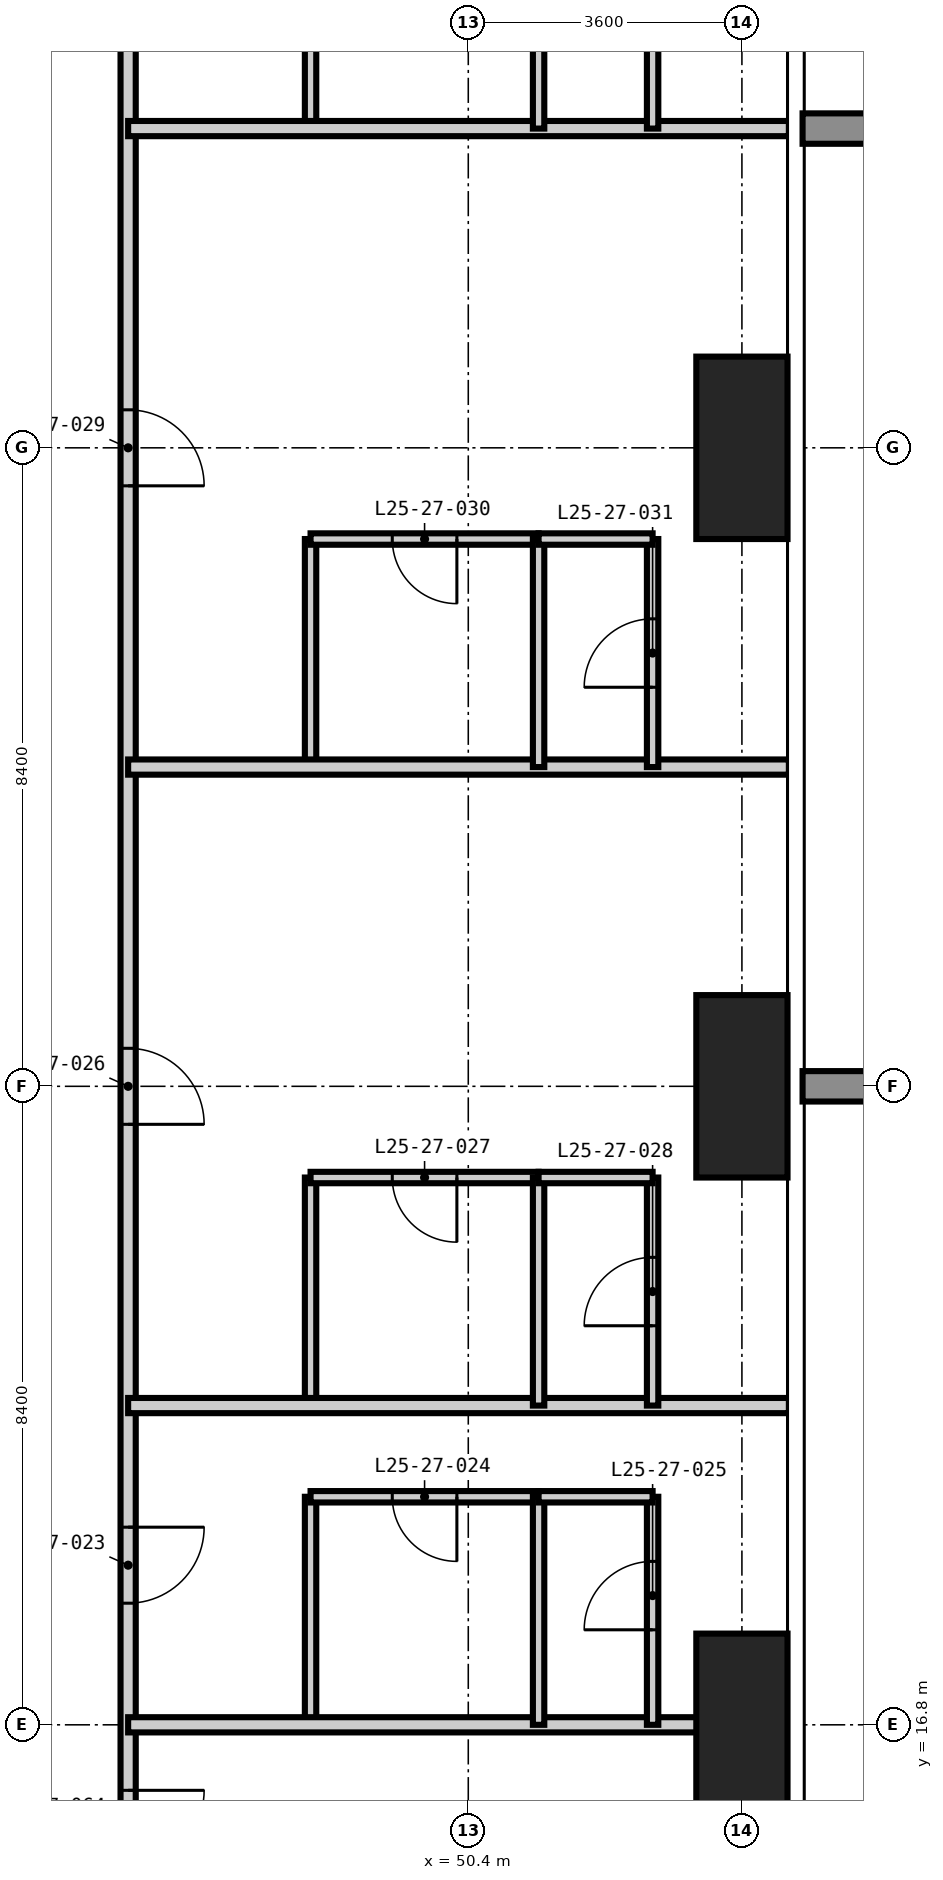
"""IFC4 building model, lengths in metres.
Left out: names, types, materials, properties, quantities, classifications, styles, units other than length and angle.
Written with IfcOpenShell. Run it as: python <this file> out.ifc"""

import sys

from ifc_helpers import new_model, si_unit, direction, frame, frame_2d, origin, origin_2d, place, context, subcontext, project, spatial, rectangle, extrude, element, fill, save


model = new_model("IFC4")
c1 = context("Model", 3, precision=1e-05, world=origin(), true_north=direction((0.0, 1.0)))
c2 = subcontext(c1, "Body", "Model", "MODEL_VIEW")
j1 = project(units=[si_unit("LENGTHUNIT", "METRE"), si_unit("PLANEANGLEUNIT", "RADIAN")], contexts=[c1])
p1 = place(None, origin())
s1 = spatial("IfcSite", under=j1, at=p1, CompositionType="ELEMENT")
p2 = place(p1, origin())
s2 = spatial("IfcBuilding", under=s1, at=p2, CompositionType="ELEMENT")
p3 = place(p2, frame((0.0, 0.0, 100.8)))
s3 = spatial("IfcBuildingStorey", under=s2, at=p3, CompositionType="ELEMENT", Elevation=100.8)
for number, where, z_axis, x_axis in (
    (1, (54.0, 16.8, -0.35), (0.0, 0.0, 1.0), (1.0, 0.0, 0.0)),
    (2, (54.0, 25.2, -0.35), (0.0, 0.0, 1.0), (1.0, 0.0, 0.0)),
    (3, (54.0, 33.6, -0.35), (0.0, 0.0, 1.0), (1.0, 0.0, 0.0)),
):
    element("IfcColumn", number, at=place(p3, frame(where, z_axis=z_axis, x_axis=x_axis)), inside=s3, PredefinedType="COLUMN", context=c2, shape_type="SweptSolid", body=[
        extrude(rectangle(XDim=1.2, YDim=2.4, at=origin_2d()), origin(), (0.0, 0.0, 1.0), 3.6),
    ])
for number, where, z_axis, x_axis in (
    (4, (48.325, 16.8, 0.0), (0.0, 0.0, 1.0), (0.0, 1.0, 0.0)),
    (5, (48.325, 21.0, 0.0), (0.0, 0.0, 1.0), (0.0, 1.0, 0.0)),
    (6, (48.325, 29.4, 0.0), (0.0, 0.0, 1.0), (0.0, 1.0, 0.0)),
    (7, (48.325, 37.8, 0.0), (0.0, 0.0, 1.0), (0.0, 1.0, 0.0)),
):
    element("IfcWall", number, at=place(p3, frame(where, z_axis=z_axis, x_axis=x_axis)), inside=s3, PredefinedType="PARTITIONING", context=c2, shape_type="SweptSolid", body=[
        extrude(rectangle(XDim=3.0, YDim=0.15, at=frame_2d((1.5, 0.0))), origin(), (0.0, 0.0, 1.0), 3.25),
    ])
p4 = place(p3, frame((48.325, 19.8, 0.0), z_axis=(0.0, 0.0, 1.0), x_axis=(1.0, 0.0, 0.0)))
e8 = element("IfcWall", 8, at=p4, inside=s3, PredefinedType="PARTITIONING", context=c2, shape_type="SweptSolid", body=[
    extrude(rectangle(XDim=3.0, YDim=0.15, at=frame_2d((1.5, 0.0))), origin(), (0.0, 0.0, 1.0), 3.25),
])
p5 = place(p4, frame((1.075, 0.0, 0.0)))
e9 = element("IfcOpeningElement", 9, at=p5, cuts=e8, PredefinedType="OPENING", context=c2, shape_type="SweptSolid", body=[
    extrude(rectangle(XDim=0.85, YDim=2.1, at=frame_2d((0.425, 1.05))), frame((0.0, 0.085, 0.0), z_axis=(0.0, -1.0, 0.0), x_axis=(1.0, 0.0, 0.0)), (0.0, 0.0, 1.0), 0.17),
])
p6 = place(p3, frame((48.325, 24.0, 0.0), z_axis=(0.0, 0.0, 1.0), x_axis=(1.0, 0.0, 0.0)))
e10 = element("IfcWall", 10, at=p6, inside=s3, PredefinedType="PARTITIONING", context=c2, shape_type="SweptSolid", body=[
    extrude(rectangle(XDim=3.0, YDim=0.15, at=frame_2d((1.5, 0.0))), origin(), (0.0, 0.0, 1.0), 3.25),
])
p7 = place(p6, frame((1.075, 0.0, 0.0)))
e11 = element("IfcOpeningElement", 11, at=p7, cuts=e10, PredefinedType="OPENING", context=c2, shape_type="SweptSolid", body=[
    extrude(rectangle(XDim=0.85, YDim=2.1, at=frame_2d((0.425, 1.05))), frame((0.0, 0.085, 0.0), z_axis=(0.0, -1.0, 0.0), x_axis=(1.0, 0.0, 0.0)), (0.0, 0.0, 1.0), 0.17),
])
p8 = place(p3, frame((48.325, 32.4, 0.0), z_axis=(0.0, 0.0, 1.0), x_axis=(1.0, 0.0, 0.0)))
e12 = element("IfcWall", 12, at=p8, inside=s3, PredefinedType="PARTITIONING", context=c2, shape_type="SweptSolid", body=[
    extrude(rectangle(XDim=3.0, YDim=0.15, at=frame_2d((1.5, 0.0))), origin(), (0.0, 0.0, 1.0), 3.25),
])
p9 = place(p8, frame((1.075, 0.0, 0.0)))
e13 = element("IfcOpeningElement", 13, at=p9, cuts=e12, PredefinedType="OPENING", context=c2, shape_type="SweptSolid", body=[
    extrude(rectangle(XDim=0.85, YDim=2.1, at=frame_2d((0.425, 1.05))), frame((0.0, 0.085, 0.0), z_axis=(0.0, -1.0, 0.0), x_axis=(1.0, 0.0, 0.0)), (0.0, 0.0, 1.0), 0.17),
])
p10 = place(p3, frame((45.925, 45.325, 0.0), z_axis=(0.0, 0.0, 1.0), x_axis=(0.0, -1.0, 0.0)))
e14 = element("IfcWall", 14, at=p10, inside=s3, PredefinedType="PARTITIONING", context=c2, shape_type="SweptSolid", body=[
    extrude(rectangle(XDim=31.25, YDim=0.2, at=frame_2d((15.625, 0.0))), origin(), (0.0, 0.0, 1.0), 3.25),
])
p11 = place(p10, frame((25.925, 0.0, 0.0)))
e15 = element("IfcOpeningElement", 15, at=p11, cuts=e14, PredefinedType="OPENING", context=c2, shape_type="SweptSolid", body=[
    extrude(rectangle(XDim=1.0, YDim=2.2, at=frame_2d((0.5, 1.1))), frame((0.0, 0.11, 0.0), z_axis=(0.0, -1.0, 0.0), x_axis=(1.0, 0.0, 0.0)), (0.0, 0.0, 1.0), 0.22),
])
p12 = place(p10, frame((19.625, 0.0, 0.0)))
e16 = element("IfcOpeningElement", 16, at=p12, cuts=e14, PredefinedType="OPENING", context=c2, shape_type="SweptSolid", body=[
    extrude(rectangle(XDim=1.0, YDim=2.2, at=frame_2d((0.5, 1.1))), frame((0.0, 0.11, 0.0), z_axis=(0.0, -1.0, 0.0), x_axis=(1.0, 0.0, 0.0)), (0.0, 0.0, 1.0), 0.22),
])
p13 = place(p10, frame((11.225, 0.0, 0.0)))
e17 = element("IfcOpeningElement", 17, at=p13, cuts=e14, PredefinedType="OPENING", context=c2, shape_type="SweptSolid", body=[
    extrude(rectangle(XDim=1.0, YDim=2.2, at=frame_2d((0.5, 1.1))), frame((0.0, 0.11, 0.0), z_axis=(0.0, -1.0, 0.0), x_axis=(1.0, 0.0, 0.0)), (0.0, 0.0, 1.0), 0.22),
])
p14 = place(p10, frame((4.925, 0.0, 0.0)))
e18 = element("IfcOpeningElement", 18, at=p14, cuts=e14, PredefinedType="OPENING", context=c2, shape_type="SweptSolid", body=[
    extrude(rectangle(XDim=1.0, YDim=2.2, at=frame_2d((0.5, 1.1))), frame((0.0, 0.11, 0.0), z_axis=(0.0, -1.0, 0.0), x_axis=(1.0, 0.0, 0.0)), (0.0, 0.0, 1.0), 0.22),
])
p15 = place(p10, frame((29.387, 0.0, 0.0)))
e19 = element("IfcOpeningElement", 19, at=p15, cuts=e14, PredefinedType="OPENING", context=c2, shape_type="SweptSolid", body=[
    extrude(rectangle(XDim=1.0, YDim=2.2, at=frame_2d((0.5, 1.1))), frame((0.0, 0.11, 0.0), z_axis=(0.0, -1.0, 0.0), x_axis=(1.0, 0.0, 0.0)), (0.0, 0.0, 1.0), 0.22),
])
p16 = place(p10, frame((1.162, 0.0, 0.0)))
e20 = element("IfcOpeningElement", 20, at=p16, cuts=e14, PredefinedType="OPENING", context=c2, shape_type="SweptSolid", body=[
    extrude(rectangle(XDim=1.0, YDim=2.2, at=frame_2d((0.5, 1.1))), frame((0.0, 0.11, 0.0), z_axis=(0.0, -1.0, 0.0), x_axis=(1.0, 0.0, 0.0)), (0.0, 0.0, 1.0), 0.22),
])
for number, where, z_axis, x_axis in (
    (21, (45.925, 16.8, 0.0), (0.0, 0.0, 1.0), (1.0, 0.0, 0.0)),
    (22, (45.925, 21.0, 0.0), (0.0, 0.0, 1.0), (1.0, 0.0, 0.0)),
    (23, (45.925, 29.4, 0.0), (0.0, 0.0, 1.0), (1.0, 0.0, 0.0)),
    (24, (45.925, 37.8, 0.0), (0.0, 0.0, 1.0), (1.0, 0.0, 0.0)),
):
    element("IfcWall", number, at=place(p3, frame(where, z_axis=z_axis, x_axis=x_axis)), inside=s3, PredefinedType="PARTITIONING", context=c2, shape_type="SweptSolid", body=[
        extrude(rectangle(XDim=8.693, YDim=0.2, at=frame_2d((4.346, 0.0))), origin(), (0.0, 0.0, 1.0), 3.25),
    ])
for number, where, z_axis, x_axis in (
    (25, (51.325, 16.8, 0.0), (0.0, 0.0, 1.0), (0.0, 1.0, 0.0)),
    (26, (51.325, 21.0, 0.0), (0.0, 0.0, 1.0), (0.0, 1.0, 0.0)),
    (27, (51.325, 29.4, 0.0), (0.0, 0.0, 1.0), (0.0, 1.0, 0.0)),
    (28, (51.325, 37.8, 0.0), (0.0, 0.0, 1.0), (0.0, 1.0, 0.0)),
):
    element("IfcWall", number, at=place(p3, frame(where, z_axis=z_axis, x_axis=x_axis)), inside=s3, PredefinedType="PARTITIONING", context=c2, shape_type="SweptSolid", body=[
        extrude(rectangle(XDim=3.0, YDim=0.15, at=frame_2d((1.5, 0.0))), origin(), (0.0, 0.0, 1.0), 3.25),
    ])
p17 = place(p3, frame((52.825, 16.8, 0.0), z_axis=(0.0, 0.0, 1.0), x_axis=(0.0, 1.0, 0.0)))
e29 = element("IfcWall", 29, at=p17, inside=s3, PredefinedType="PARTITIONING", context=c2, shape_type="SweptSolid", body=[
    extrude(rectangle(XDim=3.0, YDim=0.15, at=frame_2d((1.5, 0.0))), origin(), (0.0, 0.0, 1.0), 3.25),
])
p18 = place(p17, frame((1.25, 0.0, 0.0)))
e30 = element("IfcOpeningElement", 30, at=p18, cuts=e29, PredefinedType="OPENING", context=c2, shape_type="SweptSolid", body=[
    extrude(rectangle(XDim=0.9, YDim=2.1, at=frame_2d((0.45, 1.05))), frame((0.0, 0.085, 0.0), z_axis=(0.0, -1.0, 0.0), x_axis=(1.0, 0.0, 0.0)), (0.0, 0.0, 1.0), 0.17),
])
p19 = place(p3, frame((52.825, 21.0, 0.0), z_axis=(0.0, 0.0, 1.0), x_axis=(0.0, 1.0, 0.0)))
e31 = element("IfcWall", 31, at=p19, inside=s3, PredefinedType="PARTITIONING", context=c2, shape_type="SweptSolid", body=[
    extrude(rectangle(XDim=3.0, YDim=0.15, at=frame_2d((1.5, 0.0))), origin(), (0.0, 0.0, 1.0), 3.25),
])
p20 = place(p19, frame((1.05, 0.0, 0.0)))
e32 = element("IfcOpeningElement", 32, at=p20, cuts=e31, PredefinedType="OPENING", context=c2, shape_type="SweptSolid", body=[
    extrude(rectangle(XDim=0.9, YDim=2.1, at=frame_2d((0.45, 1.05))), frame((0.0, 0.085, 0.0), z_axis=(0.0, -1.0, 0.0), x_axis=(1.0, 0.0, 0.0)), (0.0, 0.0, 1.0), 0.17),
])
p21 = place(p3, frame((52.825, 29.4, 0.0), z_axis=(0.0, 0.0, 1.0), x_axis=(0.0, 1.0, 0.0)))
e33 = element("IfcWall", 33, at=p21, inside=s3, PredefinedType="PARTITIONING", context=c2, shape_type="SweptSolid", body=[
    extrude(rectangle(XDim=3.0, YDim=0.15, at=frame_2d((1.5, 0.0))), origin(), (0.0, 0.0, 1.0), 3.25),
])
p22 = place(p21, frame((1.05, 0.0, 0.0)))
e34 = element("IfcOpeningElement", 34, at=p22, cuts=e33, PredefinedType="OPENING", context=c2, shape_type="SweptSolid", body=[
    extrude(rectangle(XDim=0.9, YDim=2.1, at=frame_2d((0.45, 1.05))), frame((0.0, 0.085, 0.0), z_axis=(0.0, -1.0, 0.0), x_axis=(1.0, 0.0, 0.0)), (0.0, 0.0, 1.0), 0.17),
])
p23 = place(p3, frame((52.825, 37.8, 0.0), z_axis=(0.0, 0.0, 1.0), x_axis=(0.0, 1.0, 0.0)))
e35 = element("IfcWall", 35, at=p23, inside=s3, PredefinedType="PARTITIONING", context=c2, shape_type="SweptSolid", body=[
    extrude(rectangle(XDim=3.0, YDim=0.15, at=frame_2d((1.5, 0.0))), origin(), (0.0, 0.0, 1.0), 3.25),
])
p24 = place(p23, frame((1.05, 0.0, 0.0)))
e36 = element("IfcOpeningElement", 36, at=p24, cuts=e35, PredefinedType="OPENING", context=c2, shape_type="SweptSolid", body=[
    extrude(rectangle(XDim=0.9, YDim=2.1, at=frame_2d((0.45, 1.05))), frame((0.0, 0.085, 0.0), z_axis=(0.0, -1.0, 0.0), x_axis=(1.0, 0.0, 0.0)), (0.0, 0.0, 1.0), 0.17),
])
for number, where, z_axis, x_axis in (
    (37, (51.325, 19.8, 0.0), (0.0, 0.0, 1.0), (1.0, 0.0, 0.0)),
    (38, (51.325, 24.0, 0.0), (0.0, 0.0, 1.0), (1.0, 0.0, 0.0)),
    (39, (51.325, 32.4, 0.0), (0.0, 0.0, 1.0), (1.0, 0.0, 0.0)),
):
    element("IfcWall", number, at=place(p3, frame(where, z_axis=z_axis, x_axis=x_axis)), inside=s3, PredefinedType="PARTITIONING", context=c2, shape_type="SweptSolid", body=[
        extrude(rectangle(XDim=1.5, YDim=0.15, at=frame_2d((0.75, 0.0))), origin(), (0.0, 0.0, 1.0), 3.25),
    ])
p25 = place(p11, origin())
e40 = element("IfcDoor", 40, at=p25, inside=s3, OperationType="SINGLE_SWING_LEFT", PredefinedType="DOOR", context=c2, shape_type="SweptSolid", body=[
    extrude(rectangle(XDim=1.0, YDim=2.2, at=frame_2d((0.5, 1.1))), frame((0.0, 0.025, 0.0), z_axis=(0.0, -1.0, 0.0), x_axis=(1.0, 0.0, 0.0)), (0.0, 0.0, 1.0), 0.05),
])
fill(e15, e40)
p26 = place(p5, frame((0.85, 0.0, 0.0), z_axis=(0.0, 0.0, 1.0), x_axis=(-1.0, 0.0, 0.0)))
e41 = element("IfcDoor", 41, at=p26, inside=s3, OperationType="SINGLE_SWING_LEFT", PredefinedType="DOOR", context=c2, shape_type="SweptSolid", body=[
    extrude(rectangle(XDim=0.85, YDim=2.1, at=frame_2d((0.425, 1.05))), frame((0.0, 0.025, 0.0), z_axis=(0.0, -1.0, 0.0), x_axis=(1.0, 0.0, 0.0)), (0.0, 0.0, 1.0), 0.05),
])
fill(e9, e41)
p27 = place(p18, origin())
e42 = element("IfcDoor", 42, at=p27, inside=s3, OperationType="SINGLE_SWING_LEFT", PredefinedType="DOOR", context=c2, shape_type="SweptSolid", body=[
    extrude(rectangle(XDim=0.9, YDim=2.1, at=frame_2d((0.45, 1.05))), frame((0.0, 0.025, 0.0), z_axis=(0.0, -1.0, 0.0), x_axis=(1.0, 0.0, 0.0)), (0.0, 0.0, 1.0), 0.05),
])
fill(e30, e42)
p28 = place(p12, origin())
e43 = element("IfcDoor", 43, at=p28, inside=s3, OperationType="SINGLE_SWING_RIGHT", PredefinedType="DOOR", context=c2, shape_type="SweptSolid", body=[
    extrude(rectangle(XDim=1.0, YDim=2.2, at=frame_2d((0.5, 1.1))), frame((0.0, 0.025, 0.0), z_axis=(0.0, -1.0, 0.0), x_axis=(1.0, 0.0, 0.0)), (0.0, 0.0, 1.0), 0.05),
])
fill(e16, e43)
p29 = place(p7, frame((0.85, 0.0, 0.0), z_axis=(0.0, 0.0, 1.0), x_axis=(-1.0, 0.0, 0.0)))
e44 = element("IfcDoor", 44, at=p29, inside=s3, OperationType="SINGLE_SWING_LEFT", PredefinedType="DOOR", context=c2, shape_type="SweptSolid", body=[
    extrude(rectangle(XDim=0.85, YDim=2.1, at=frame_2d((0.425, 1.05))), frame((0.0, 0.025, 0.0), z_axis=(0.0, -1.0, 0.0), x_axis=(1.0, 0.0, 0.0)), (0.0, 0.0, 1.0), 0.05),
])
fill(e11, e44)
p30 = place(p20, origin())
e45 = element("IfcDoor", 45, at=p30, inside=s3, OperationType="SINGLE_SWING_LEFT", PredefinedType="DOOR", context=c2, shape_type="SweptSolid", body=[
    extrude(rectangle(XDim=0.9, YDim=2.1, at=frame_2d((0.45, 1.05))), frame((0.0, 0.025, 0.0), z_axis=(0.0, -1.0, 0.0), x_axis=(1.0, 0.0, 0.0)), (0.0, 0.0, 1.0), 0.05),
])
fill(e32, e45)
p31 = place(p13, origin())
e46 = element("IfcDoor", 46, at=p31, inside=s3, OperationType="SINGLE_SWING_RIGHT", PredefinedType="DOOR", context=c2, shape_type="SweptSolid", body=[
    extrude(rectangle(XDim=1.0, YDim=2.2, at=frame_2d((0.5, 1.1))), frame((0.0, 0.025, 0.0), z_axis=(0.0, -1.0, 0.0), x_axis=(1.0, 0.0, 0.0)), (0.0, 0.0, 1.0), 0.05),
])
fill(e17, e46)
p32 = place(p9, frame((0.85, 0.0, 0.0), z_axis=(0.0, 0.0, 1.0), x_axis=(-1.0, 0.0, 0.0)))
e47 = element("IfcDoor", 47, at=p32, inside=s3, OperationType="SINGLE_SWING_LEFT", PredefinedType="DOOR", context=c2, shape_type="SweptSolid", body=[
    extrude(rectangle(XDim=0.85, YDim=2.1, at=frame_2d((0.425, 1.05))), frame((0.0, 0.025, 0.0), z_axis=(0.0, -1.0, 0.0), x_axis=(1.0, 0.0, 0.0)), (0.0, 0.0, 1.0), 0.05),
])
fill(e13, e47)
p33 = place(p22, origin())
e48 = element("IfcDoor", 48, at=p33, inside=s3, OperationType="SINGLE_SWING_LEFT", PredefinedType="DOOR", context=c2, shape_type="SweptSolid", body=[
    extrude(rectangle(XDim=0.9, YDim=2.1, at=frame_2d((0.45, 1.05))), frame((0.0, 0.025, 0.0), z_axis=(0.0, -1.0, 0.0), x_axis=(1.0, 0.0, 0.0)), (0.0, 0.0, 1.0), 0.05),
])
fill(e34, e48)
p34 = place(p15, origin())
e49 = element("IfcDoor", 49, at=p34, inside=s3, OperationType="SINGLE_SWING_LEFT", PredefinedType="DOOR", context=c2, shape_type="SweptSolid", body=[
    extrude(rectangle(XDim=1.0, YDim=2.2, at=frame_2d((0.5, 1.1))), frame((0.0, 0.025, 0.0), z_axis=(0.0, -1.0, 0.0), x_axis=(1.0, 0.0, 0.0)), (0.0, 0.0, 1.0), 0.05),
])
fill(e19, e49)
save(model, sys.argv[1])
